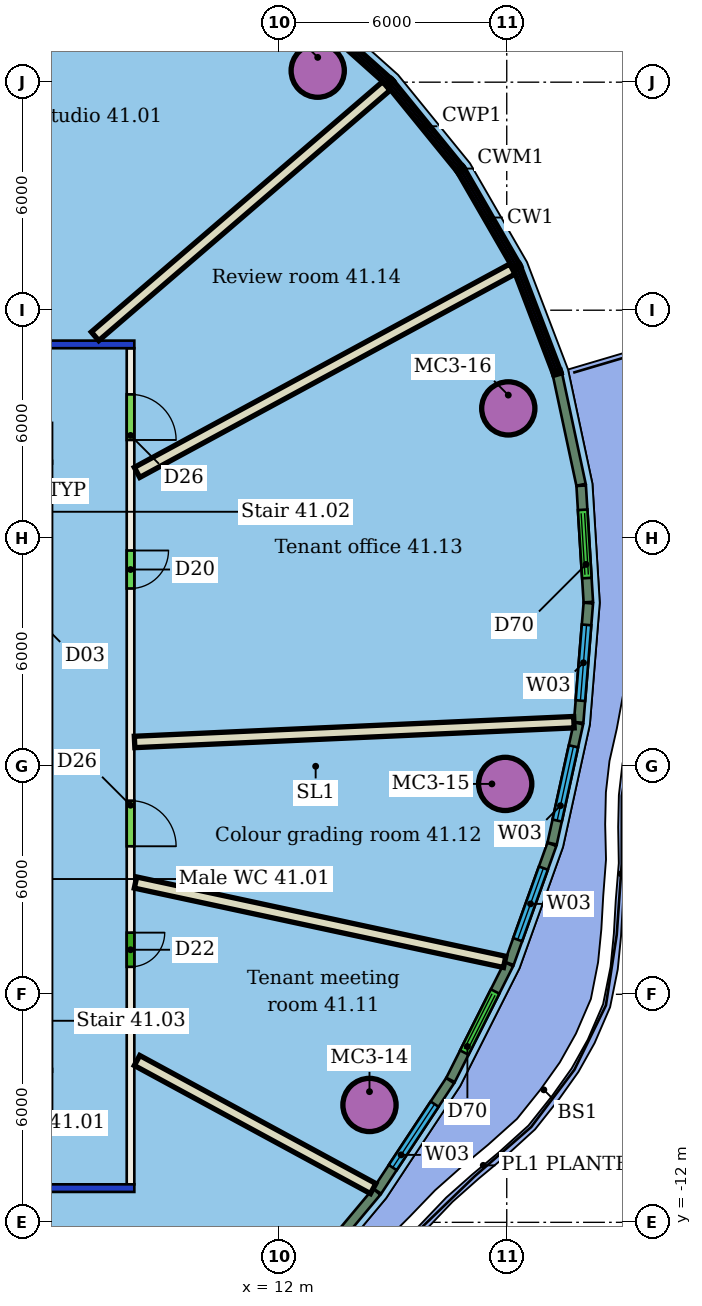
"""IFC4 building model, lengths in metres.
Left out: names, types, materials, properties, quantities, classifications, styles, units other than length and angle.
Written with IfcOpenShell. Run it as: python <this file> out.ifc"""

import sys

from ifc_helpers import new_model, si_unit, direction, frame, frame_2d, origin, origin_2d, place, context, subcontext, project, spatial, rectangle, hollow_circle, extrude, element, fill, save


model = new_model("IFC4")
c1 = context("Model", 3, precision=1e-05, world=origin(), true_north=direction((0.0, 1.0)))
c2 = subcontext(c1, "Body", "Model", "MODEL_VIEW")
j1 = project(units=[si_unit("LENGTHUNIT", "METRE"), si_unit("PLANEANGLEUNIT", "RADIAN")], contexts=[c1])
p1 = place(None, origin())
s1 = spatial("IfcSite", under=j1, at=p1, CompositionType="ELEMENT")
p2 = place(p1, origin())
s2 = spatial("IfcBuilding", under=s1, at=p2, CompositionType="ELEMENT")
p3 = place(p2, frame((0.0, 0.0, 172.2)))
s3 = spatial("IfcBuildingStorey", under=s2, at=p3, CompositionType="ELEMENT", Elevation=172.2)
for number, where, z_axis, x_axis in (
    (1, (13.026, 18.303, 0.0), (0.0, 0.0, 1.0), (1.0, 0.0, 0.0)),
    (2, (14.388, -8.912, 0.0), (0.0, 0.0, 1.0), (1.0, 0.0, 0.0)),
    (3, (17.959, -0.464, 0.0), (0.0, 0.0, 1.0), (1.0, 0.0, 0.0)),
    (4, (18.041, 9.417, 0.0), (0.0, 0.0, 1.0), (1.0, 0.0, 0.0)),
):
    element("IfcColumn", number, at=place(p3, frame(where, z_axis=z_axis, x_axis=x_axis)), inside=s3, PredefinedType="COLUMN", context=c2, shape_type="SweptSolid", body=[
        extrude(hollow_circle(Radius=0.7, WallThickness=0.05, at=origin_2d()), origin(), (0.0, 0.0, 1.0), 3.45),
    ])
p4 = place(p3, frame((8.2, -11.1, 0.0), z_axis=(0.0, 0.0, 1.0), x_axis=(-1.0, 0.0, 0.0)))
e5 = element("IfcWall", 5, at=p4, inside=s3, PredefinedType="PARTITIONING", context=c2, shape_type="SweptSolid", body=[
    extrude(rectangle(XDim=28.4, YDim=0.2, at=frame_2d((14.2, 0.0))), origin(), (0.0, 0.0, 1.0), 3.05),
])
p5 = place(p4, frame((22.698, 0.0, 0.0)))
e6 = element("IfcOpeningElement", 6, at=p5, cuts=e5, PredefinedType="OPENING", context=c2, shape_type="SweptSolid", body=[
    extrude(rectangle(XDim=1.8, YDim=2.1, at=frame_2d((0.9, 1.05))), frame((0.0, 0.11, 0.0), z_axis=(0.0, -1.0, 0.0), x_axis=(1.0, 0.0, 0.0)), (0.0, 0.0, 1.0), 0.22),
])
p6 = place(p4, frame((18.72, 0.0, 0.0)))
e7 = element("IfcOpeningElement", 7, at=p6, cuts=e5, PredefinedType="OPENING", context=c2, shape_type="SweptSolid", body=[
    extrude(rectangle(XDim=1.2, YDim=2.1, at=frame_2d((0.6, 1.05))), frame((0.0, 0.11, 0.0), z_axis=(0.0, -1.0, 0.0), x_axis=(1.0, 0.0, 0.0)), (0.0, 0.0, 1.0), 0.22),
])
p7 = place(p4, frame((15.144, 0.0, 0.0)))
e8 = element("IfcOpeningElement", 8, at=p7, cuts=e5, PredefinedType="OPENING", context=c2, shape_type="SweptSolid", body=[
    extrude(rectangle(XDim=1.0, YDim=2.1, at=frame_2d((0.5, 1.05))), frame((0.0, 0.11, 0.0), z_axis=(0.0, -1.0, 0.0), x_axis=(1.0, 0.0, 0.0)), (0.0, 0.0, 1.0), 0.22),
])
p8 = place(p4, frame((9.873, 0.0, 0.0)))
e9 = element("IfcOpeningElement", 9, at=p8, cuts=e5, PredefinedType="OPENING", context=c2, shape_type="SweptSolid", body=[
    extrude(rectangle(XDim=1.2, YDim=2.1, at=frame_2d((0.6, 1.05))), frame((0.0, 0.11, 0.0), z_axis=(0.0, -1.0, 0.0), x_axis=(1.0, 0.0, 0.0)), (0.0, 0.0, 1.0), 0.22),
])
p9 = place(p4, frame((5.181, 0.0, 0.0)))
e10 = element("IfcOpeningElement", 10, at=p9, cuts=e5, PredefinedType="OPENING", context=c2, shape_type="SweptSolid", body=[
    extrude(rectangle(XDim=1.2, YDim=2.1, at=frame_2d((0.6, 1.05))), frame((0.0, 0.11, 0.0), z_axis=(0.0, -1.0, 0.0), x_axis=(1.0, 0.0, 0.0)), (0.0, 0.0, 1.0), 0.22),
])
p10 = place(p3, frame((-20.2, 11.1, 0.0), z_axis=(0.0, 0.0, 1.0), x_axis=(1.0, 0.0, 0.0)))
e11 = element("IfcWall", 11, at=p10, inside=s3, PredefinedType="PARTITIONING", context=c2, shape_type="SweptSolid", body=[
    extrude(rectangle(XDim=28.4, YDim=0.2, at=frame_2d((14.2, 0.0))), origin(), (0.0, 0.0, 1.0), 3.05),
])
p11 = place(p10, frame((20.272, 0.0, 0.0)))
e12 = element("IfcOpeningElement", 12, at=p11, cuts=e11, PredefinedType="OPENING", context=c2, shape_type="SweptSolid", body=[
    extrude(rectangle(XDim=1.1, YDim=2.1, at=frame_2d((0.55, 1.05))), frame((0.0, 0.11, 0.0), z_axis=(0.0, -1.0, 0.0), x_axis=(1.0, 0.0, 0.0)), (0.0, 0.0, 1.0), 0.22),
])
p12 = place(p10, frame((11.124, 0.0, 0.0)))
e13 = element("IfcOpeningElement", 13, at=p12, cuts=e11, PredefinedType="OPENING", context=c2, shape_type="SweptSolid", body=[
    extrude(rectangle(XDim=1.8, YDim=2.1, at=frame_2d((0.9, 1.05))), frame((0.0, 0.11, 0.0), z_axis=(0.0, -1.0, 0.0), x_axis=(1.0, 0.0, 0.0)), (0.0, 0.0, 1.0), 0.22),
])
p13 = place(p10, frame((5.001, 0.0, 0.0)))
e14 = element("IfcOpeningElement", 14, at=p13, cuts=e11, PredefinedType="OPENING", context=c2, shape_type="SweptSolid", body=[
    extrude(rectangle(XDim=1.5, YDim=2.1, at=frame_2d((0.75, 1.05))), frame((0.0, 0.11, 0.0), z_axis=(0.0, -1.0, 0.0), x_axis=(1.0, 0.0, 0.0)), (0.0, 0.0, 1.0), 0.22),
])
p14 = place(p3, frame((8.1, 11.0, 0.0), z_axis=(0.0, 0.0, 1.0), x_axis=(0.0, -1.0, 0.0)))
e15 = element("IfcWall", 15, at=p14, inside=s3, PredefinedType="PARTITIONING", context=c2, shape_type="SweptSolid", body=[
    extrude(rectangle(XDim=22.0, YDim=0.2, at=frame_2d((11.0, 0.0))), origin(), (0.0, 0.0, 1.0), 3.45),
])
p15 = place(p14, frame((15.378, 0.0, 0.0)))
e16 = element("IfcOpeningElement", 16, at=p15, cuts=e15, PredefinedType="OPENING", context=c2, shape_type="SweptSolid", body=[
    extrude(rectangle(XDim=0.9, YDim=2.1, at=frame_2d((0.45, 1.05))), frame((0.0, 0.11, 0.0), z_axis=(0.0, -1.0, 0.0), x_axis=(1.0, 0.0, 0.0)), (0.0, 0.0, 1.0), 0.22),
])
p16 = place(p14, frame((11.905, 0.0, 0.0)))
e17 = element("IfcOpeningElement", 17, at=p16, cuts=e15, PredefinedType="OPENING", context=c2, shape_type="SweptSolid", body=[
    extrude(rectangle(XDim=1.2, YDim=2.1, at=frame_2d((0.6, 1.05))), frame((0.0, 0.11, 0.0), z_axis=(0.0, -1.0, 0.0), x_axis=(1.0, 0.0, 0.0)), (0.0, 0.0, 1.0), 0.22),
])
p17 = place(p14, frame((5.323, 0.0, 0.0)))
e18 = element("IfcOpeningElement", 18, at=p17, cuts=e15, PredefinedType="OPENING", context=c2, shape_type="SweptSolid", body=[
    extrude(rectangle(XDim=1.0, YDim=2.1, at=frame_2d((0.5, 1.05))), frame((0.0, 0.11, 0.0), z_axis=(0.0, -1.0, 0.0), x_axis=(1.0, 0.0, 0.0)), (0.0, 0.0, 1.0), 0.22),
])
p18 = place(p14, frame((1.215, 0.0, 0.0)))
e19 = element("IfcOpeningElement", 19, at=p18, cuts=e15, PredefinedType="OPENING", context=c2, shape_type="SweptSolid", body=[
    extrude(rectangle(XDim=1.2, YDim=2.1, at=frame_2d((0.6, 1.05))), frame((0.0, 0.11, 0.0), z_axis=(0.0, -1.0, 0.0), x_axis=(1.0, 0.0, 0.0)), (0.0, 0.0, 1.0), 0.22),
])
p19 = place(p3, frame((14.832, 17.9, 0.0), z_axis=(0.0, 0.0, 1.0), x_axis=(-0.758456240409, -0.651723968705, 0.0)))
e20 = element("IfcWall", 20, at=p19, inside=s3, PredefinedType="PARTITIONING", context=c2, shape_type="SweptSolid", body=[
    extrude(rectangle(XDim=10.106, YDim=0.3, at=frame_2d((5.053, 0.0))), origin(), (0.0, 0.0, 1.0), 3.45),
])
p20 = place(p3, frame((14.485, -11.112, 0.0), z_axis=(0.0, 0.0, 1.0), x_axis=(-0.879008547769, 0.476806011864, 0.0)))
e21 = element("IfcWall", 21, at=p20, inside=s3, PredefinedType="PARTITIONING", context=c2, shape_type="SweptSolid", body=[
    extrude(rectangle(XDim=7.069, YDim=0.3, at=frame_2d((3.534, 0.0))), origin(), (0.0, 0.0, 1.0), 3.45),
])
p21 = place(p3, frame((17.946, -5.147, 0.0), z_axis=(0.0, 0.0, 1.0), x_axis=(-0.977667369108, 0.210158310286, 0.0)))
e22 = element("IfcWall", 22, at=p21, inside=s3, PredefinedType="PARTITIONING", context=c2, shape_type="SweptSolid", body=[
    extrude(rectangle(XDim=9.936, YDim=0.3, at=frame_2d((4.968, 0.0))), origin(), (0.0, 0.0, 1.0), 3.45),
])
p22 = place(p3, frame((19.768, 1.16, 0.0), z_axis=(0.0, 0.0, 1.0), x_axis=(-0.998987978485, -0.044977981757, 0.0)))
e23 = element("IfcWall", 23, at=p22, inside=s3, PredefinedType="PARTITIONING", context=c2, shape_type="SweptSolid", body=[
    extrude(rectangle(XDim=11.573, YDim=0.3, at=frame_2d((5.786, 0.0))), origin(), (0.0, 0.0, 1.0), 3.45),
])
p23 = place(p3, frame((18.149, 13.084, 0.0), z_axis=(0.0, 0.0, 1.0), x_axis=(-0.879249111844, -0.476362256398, 0.0)))
e24 = element("IfcWall", 24, at=p23, inside=s3, PredefinedType="PARTITIONING", context=c2, shape_type="SweptSolid", body=[
    extrude(rectangle(XDim=11.234, YDim=0.3, at=frame_2d((5.617, 0.0))), origin(), (0.0, 0.0, 1.0), 3.45),
])
p24 = place(p3, frame((12.335, -13.878, 0.0), z_axis=(0.0, 0.0, 1.0), x_axis=(0.64142670303, 0.767184322468, 0.0)))
e25 = element("IfcWall", 25, at=p24, inside=s3, PredefinedType="SOLIDWALL", context=c2, shape_type="SweptSolid", body=[
    extrude(rectangle(XDim=3.496, YDim=0.25, at=frame_2d((1.748, 0.0))), origin(), (0.0, 0.0, 1.0), 3.1),
])
p25 = place(p3, frame((14.591, -11.177, 0.0), z_axis=(0.0, 0.0, 1.0), x_axis=(0.551021923649, 0.834490766671, 0.0)))
e26 = element("IfcWall", 26, at=p25, inside=s3, PredefinedType="SOLIDWALL", context=c2, shape_type="SweptSolid", body=[
    extrude(rectangle(XDim=3.482, YDim=0.25, at=frame_2d((1.741, 0.0))), origin(), (0.0, 0.0, 1.0), 3.1),
])
p26 = place(p25, frame((0.741, 0.0, 0.9)))
e27 = element("IfcOpeningElement", 27, at=p26, cuts=e26, PredefinedType="OPENING", context=c2, shape_type="SweptSolid", body=[
    extrude(rectangle(XDim=2.0, YDim=2.1, at=frame_2d((1.0, 1.05))), frame((0.0, 0.135, 0.0), z_axis=(0.0, -1.0, 0.0), x_axis=(1.0, 0.0, 0.0)), (0.0, 0.0, 1.0), 0.27),
])
p27 = place(p3, frame((16.521, -8.252, 0.0), z_axis=(0.0, 0.0, 1.0), x_axis=(0.449903975736, 0.893076935441, 0.0)))
e28 = element("IfcWall", 28, at=p27, inside=s3, PredefinedType="SOLIDWALL", context=c2, shape_type="SweptSolid", body=[
    extrude(rectangle(XDim=3.409, YDim=0.25, at=frame_2d((1.705, 0.0))), origin(), (0.0, 0.0, 1.0), 3.1),
])
p28 = place(p27, frame((0.805, 0.0, 0.0)))
e29 = element("IfcOpeningElement", 29, at=p28, cuts=e28, PredefinedType="OPENING", context=c2, shape_type="SweptSolid", body=[
    extrude(rectangle(XDim=1.8, YDim=2.4, at=frame_2d((0.9, 1.2))), frame((0.0, 0.135, 0.0), z_axis=(0.0, -1.0, 0.0), x_axis=(1.0, 0.0, 0.0)), (0.0, 0.0, 1.0), 0.27),
])
p29 = place(p3, frame((18.064, -5.186, 0.0), z_axis=(0.0, 0.0, 1.0), x_axis=(0.337661333214, 0.941267668653, 0.0)))
e30 = element("IfcWall", 30, at=p29, inside=s3, PredefinedType="SOLIDWALL", context=c2, shape_type="SweptSolid", body=[
    extrude(rectangle(XDim=3.326, YDim=0.25, at=frame_2d((1.663, 0.0))), origin(), (0.0, 0.0, 1.0), 3.1),
])
p30 = place(p29, frame((0.663, 0.0, 0.9)))
e31 = element("IfcOpeningElement", 31, at=p30, cuts=e30, PredefinedType="OPENING", context=c2, shape_type="SweptSolid", body=[
    extrude(rectangle(XDim=2.0, YDim=2.1, at=frame_2d((1.0, 1.05))), frame((0.0, 0.135, 0.0), z_axis=(0.0, -1.0, 0.0), x_axis=(1.0, 0.0, 0.0)), (0.0, 0.0, 1.0), 0.27),
])
p31 = place(p3, frame((19.194, -2.032, 0.0), z_axis=(0.0, 0.0, 1.0), x_axis=(0.21439852093, 0.976746269111, 0.0)))
e32 = element("IfcWall", 32, at=p31, inside=s3, PredefinedType="SOLIDWALL", context=c2, shape_type="SweptSolid", body=[
    extrude(rectangle(XDim=3.237, YDim=0.25, at=frame_2d((1.619, 0.0))), origin(), (0.0, 0.0, 1.0), 3.1),
])
p32 = place(p31, frame((0.619, 0.0, 0.9)))
e33 = element("IfcOpeningElement", 33, at=p32, cuts=e32, PredefinedType="OPENING", context=c2, shape_type="SweptSolid", body=[
    extrude(rectangle(XDim=2.0, YDim=2.1, at=frame_2d((1.0, 1.05))), frame((0.0, 0.135, 0.0), z_axis=(0.0, -1.0, 0.0), x_axis=(1.0, 0.0, 0.0)), (0.0, 0.0, 1.0), 0.27),
])
p33 = place(p3, frame((19.892, 1.154, 0.0), z_axis=(0.0, 0.0, 1.0), x_axis=(0.080857499855, 0.996725671746, 0.0)))
e34 = element("IfcWall", 34, at=p33, inside=s3, PredefinedType="SOLIDWALL", context=c2, shape_type="SweptSolid", body=[
    extrude(rectangle(XDim=3.149, YDim=0.25, at=frame_2d((1.575, 0.0))), origin(), (0.0, 0.0, 1.0), 3.1),
])
p34 = place(p33, frame((0.575, 0.0, 0.9)))
e35 = element("IfcOpeningElement", 35, at=p34, cuts=e34, PredefinedType="OPENING", context=c2, shape_type="SweptSolid", body=[
    extrude(rectangle(XDim=2.0, YDim=2.1, at=frame_2d((1.0, 1.05))), frame((0.0, 0.135, 0.0), z_axis=(0.0, -1.0, 0.0), x_axis=(1.0, 0.0, 0.0)), (0.0, 0.0, 1.0), 0.27),
])
p35 = place(p3, frame((20.147, 4.319, 0.0), z_axis=(0.0, 0.0, 1.0), x_axis=(-0.061432025832, 0.99811126945, 0.0)))
e36 = element("IfcWall", 36, at=p35, inside=s3, PredefinedType="SOLIDWALL", context=c2, shape_type="SweptSolid", body=[
    extrude(rectangle(XDim=3.068, YDim=0.25, at=frame_2d((1.534, 0.0))), origin(), (0.0, 0.0, 1.0), 3.1),
])
p36 = place(p35, frame((0.634, 0.0, 0.0)))
e37 = element("IfcOpeningElement", 37, at=p36, cuts=e36, PredefinedType="OPENING", context=c2, shape_type="SweptSolid", body=[
    extrude(rectangle(XDim=1.8, YDim=2.4, at=frame_2d((0.9, 1.2))), frame((0.0, 0.135, 0.0), z_axis=(0.0, -1.0, 0.0), x_axis=(1.0, 0.0, 0.0)), (0.0, 0.0, 1.0), 0.27),
])
p37 = place(p3, frame((19.955, 7.408, 0.0), z_axis=(0.0, 0.0, 1.0), x_axis=(-0.208841558972, 0.977949489108, 0.0)))
e38 = element("IfcWall", 38, at=p37, inside=s3, PredefinedType="SOLIDWALL", context=c2, shape_type="SweptSolid", body=[
    extrude(rectangle(XDim=2.959, YDim=0.25, at=frame_2d((1.479, 0.0))), origin(), (0.0, 0.0, 1.0), 3.1),
])
p38 = place(p15, origin())
e39 = element("IfcDoor", 39, at=p38, inside=s3, OperationType="SINGLE_SWING_LEFT", PredefinedType="DOOR", context=c2, shape_type="SweptSolid", body=[
    extrude(rectangle(XDim=0.9, YDim=2.1, at=frame_2d((0.45, 1.05))), frame((0.0, 0.025, 0.0), z_axis=(0.0, -1.0, 0.0), x_axis=(1.0, 0.0, 0.0)), (0.0, 0.0, 1.0), 0.05),
])
fill(e16, e39)
p39 = place(p16, origin())
e40 = element("IfcDoor", 40, at=p39, inside=s3, OperationType="SINGLE_SWING_RIGHT", PredefinedType="DOOR", context=c2, shape_type="SweptSolid", body=[
    extrude(rectangle(XDim=1.2, YDim=2.1, at=frame_2d((0.6, 1.05))), frame((0.0, 0.025, 0.0), z_axis=(0.0, -1.0, 0.0), x_axis=(1.0, 0.0, 0.0)), (0.0, 0.0, 1.0), 0.05),
])
fill(e17, e40)
p40 = place(p17, origin())
e41 = element("IfcDoor", 41, at=p40, inside=s3, OperationType="SINGLE_SWING_LEFT", PredefinedType="DOOR", context=c2, shape_type="SweptSolid", body=[
    extrude(rectangle(XDim=1.0, YDim=2.1, at=frame_2d((0.5, 1.05))), frame((0.0, 0.025, 0.0), z_axis=(0.0, -1.0, 0.0), x_axis=(1.0, 0.0, 0.0)), (0.0, 0.0, 1.0), 0.05),
])
fill(e18, e41)
p41 = place(p18, origin())
e42 = element("IfcDoor", 42, at=p41, inside=s3, OperationType="SINGLE_SWING_RIGHT", PredefinedType="DOOR", context=c2, shape_type="SweptSolid", body=[
    extrude(rectangle(XDim=1.2, YDim=2.1, at=frame_2d((0.6, 1.05))), frame((0.0, 0.025, 0.0), z_axis=(0.0, -1.0, 0.0), x_axis=(1.0, 0.0, 0.0)), (0.0, 0.0, 1.0), 0.05),
])
fill(e19, e42)
p42 = place(p26, origin())
e43 = element("IfcWindow", 43, at=p42, inside=s3, PartitioningType="SINGLE_PANEL", PredefinedType="WINDOW", context=c2, shape_type="SweptSolid", body=[
    extrude(rectangle(XDim=2.0, YDim=2.1, at=frame_2d((1.0, 1.05))), frame((0.0, 0.03, 0.0), z_axis=(0.0, -1.0, 0.0), x_axis=(1.0, 0.0, 0.0)), (0.0, 0.0, 1.0), 0.06),
])
fill(e27, e43)
p43 = place(p28, origin())
e44 = element("IfcDoor", 44, at=p43, inside=s3, OperationType="DOUBLE_DOOR_SLIDING", PredefinedType="DOOR", context=c2, shape_type="SweptSolid", body=[
    extrude(rectangle(XDim=1.8, YDim=2.4, at=frame_2d((0.9, 1.2))), frame((0.0, 0.025, 0.0), z_axis=(0.0, -1.0, 0.0), x_axis=(1.0, 0.0, 0.0)), (0.0, 0.0, 1.0), 0.05),
])
fill(e29, e44)
p44 = place(p30, origin())
e45 = element("IfcWindow", 45, at=p44, inside=s3, PartitioningType="SINGLE_PANEL", PredefinedType="WINDOW", context=c2, shape_type="SweptSolid", body=[
    extrude(rectangle(XDim=2.0, YDim=2.1, at=frame_2d((1.0, 1.05))), frame((0.0, 0.03, 0.0), z_axis=(0.0, -1.0, 0.0), x_axis=(1.0, 0.0, 0.0)), (0.0, 0.0, 1.0), 0.06),
])
fill(e31, e45)
p45 = place(p32, origin())
e46 = element("IfcWindow", 46, at=p45, inside=s3, PartitioningType="SINGLE_PANEL", PredefinedType="WINDOW", context=c2, shape_type="SweptSolid", body=[
    extrude(rectangle(XDim=2.0, YDim=2.1, at=frame_2d((1.0, 1.05))), frame((0.0, 0.03, 0.0), z_axis=(0.0, -1.0, 0.0), x_axis=(1.0, 0.0, 0.0)), (0.0, 0.0, 1.0), 0.06),
])
fill(e33, e46)
p46 = place(p34, origin())
e47 = element("IfcWindow", 47, at=p46, inside=s3, PartitioningType="SINGLE_PANEL", PredefinedType="WINDOW", context=c2, shape_type="SweptSolid", body=[
    extrude(rectangle(XDim=2.0, YDim=2.1, at=frame_2d((1.0, 1.05))), frame((0.0, 0.03, 0.0), z_axis=(0.0, -1.0, 0.0), x_axis=(1.0, 0.0, 0.0)), (0.0, 0.0, 1.0), 0.06),
])
fill(e35, e47)
p47 = place(p36, origin())
e48 = element("IfcDoor", 48, at=p47, inside=s3, OperationType="DOUBLE_DOOR_SLIDING", PredefinedType="DOOR", context=c2, shape_type="SweptSolid", body=[
    extrude(rectangle(XDim=1.8, YDim=2.4, at=frame_2d((0.9, 1.2))), frame((0.0, 0.025, 0.0), z_axis=(0.0, -1.0, 0.0), x_axis=(1.0, 0.0, 0.0)), (0.0, 0.0, 1.0), 0.05),
])
fill(e37, e48)
save(model, sys.argv[1])
